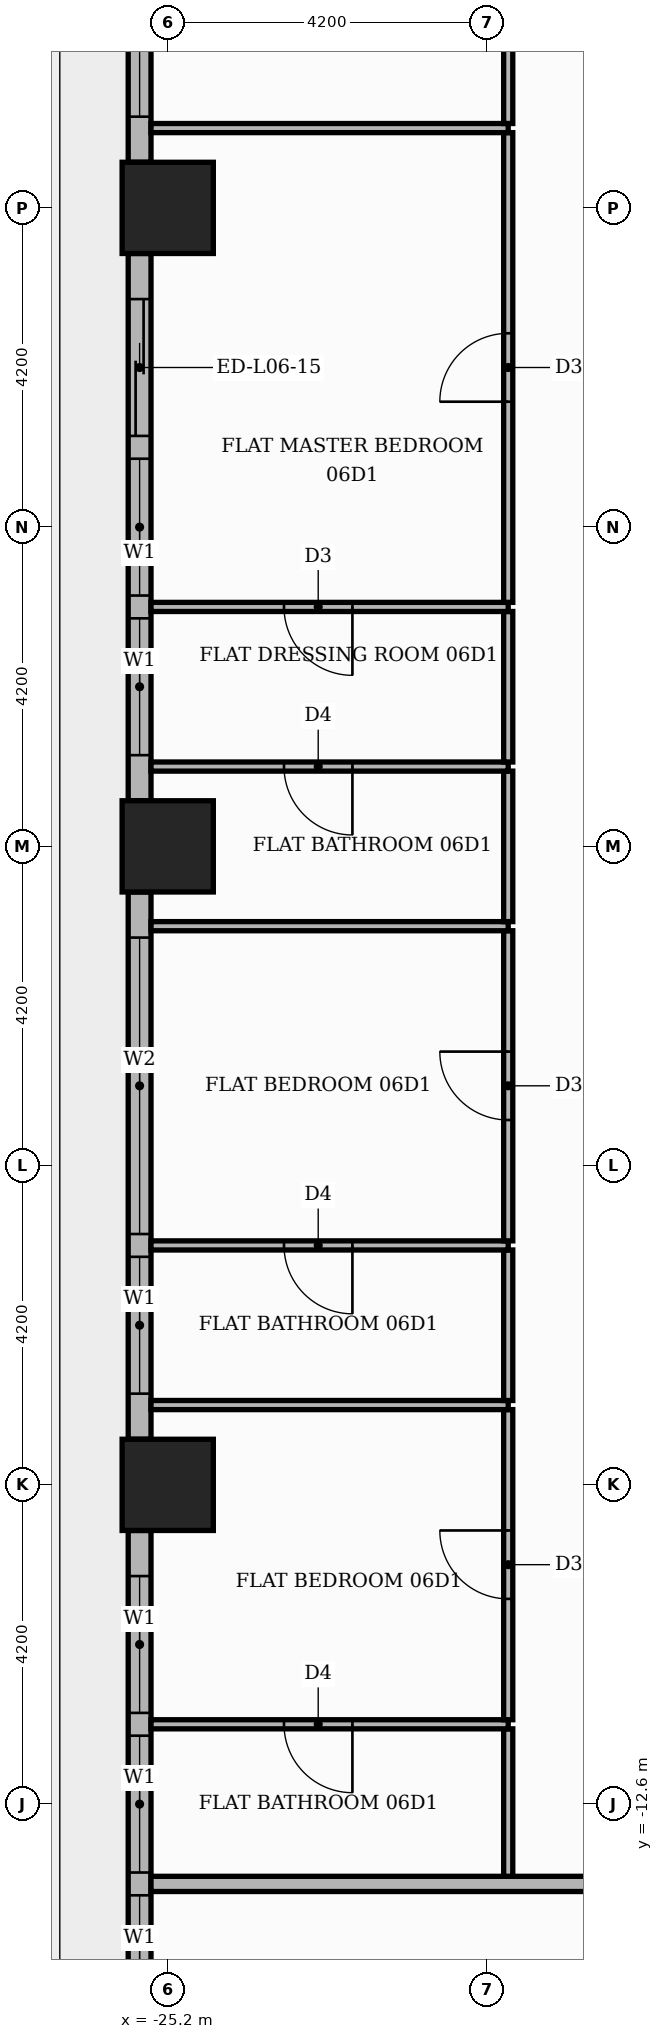
"""IFC4 building model, lengths in metres.
Left out: names, types, materials, properties, quantities, classifications, styles, units other than length and angle.
Written with IfcOpenShell. Run it as: python <this file> out.ifc"""

import sys

from ifc_helpers import new_model, si_unit, direction, frame, frame_2d, origin, origin_2d, place, context, subcontext, project, spatial, rectangle, extrude, element, fill, save


model = new_model("IFC4")
c1 = context("Model", 3, precision=1e-05, world=origin(), true_north=direction((0.0, 1.0)))
c2 = subcontext(c1, "Body", "Model", "MODEL_VIEW")
j1 = project(units=[si_unit("LENGTHUNIT", "METRE"), si_unit("PLANEANGLEUNIT", "RADIAN")], contexts=[c1])
p1 = place(None, origin())
s1 = spatial("IfcSite", under=j1, at=p1, CompositionType="ELEMENT")
p2 = place(p1, origin())
s2 = spatial("IfcBuilding", under=s1, at=p2, CompositionType="ELEMENT")
p3 = place(p2, frame((0.0, 0.0, 30.9)))
s3 = spatial("IfcBuildingStorey", under=s2, at=p3, CompositionType="ELEMENT", Elevation=30.9)
for number, where, z_axis, x_axis in (
    (1, (-25.2, 0.0, 0.0), (0.0, 0.0, 1.0), (1.0, 0.0, 0.0)),
    (2, (-25.2, -8.4, 0.0), (0.0, 0.0, 1.0), (1.0, 0.0, 0.0)),
    (3, (-25.2, 8.4, 0.0), (0.0, 0.0, 1.0), (1.0, 0.0, 0.0)),
):
    element("IfcColumn", number, at=place(p3, frame(where, z_axis=z_axis, x_axis=x_axis)), inside=s3, PredefinedType="COLUMN", context=c2, shape_type="SweptSolid", body=[
        extrude(rectangle(XDim=1.2, YDim=1.2, at=origin_2d()), origin(), (0.0, 0.0, 1.0), 3.9),
    ])
p4 = place(p3, frame((-25.57, 16.2, 0.0), z_axis=(0.0, 0.0, 1.0), x_axis=(0.0, -1.0, 0.0)))
e4 = element("IfcWall", 4, at=p4, inside=s3, PredefinedType="STANDARD", context=c2, shape_type="SweptSolid", body=[
    extrude(rectangle(XDim=7.2, YDim=0.3, at=frame_2d((3.6, 0.0))), origin(), (0.0, 0.0, 1.0), 3.48),
])
p5 = place(p4, frame((0.6, 0.0, 0.0)))
e5 = element("IfcOpeningElement", 5, at=p5, cuts=e4, PredefinedType="OPENING", context=c2, shape_type="SweptSolid", body=[
    extrude(rectangle(XDim=1.8, YDim=2.4, at=frame_2d((0.9, 1.2))), frame((0.0, 0.16, 0.0), z_axis=(0.0, -1.0, 0.0), x_axis=(1.0, 0.0, 0.0)), (0.0, 0.0, 1.0), 0.32),
])
p6 = place(p4, frame((2.7, 0.0, 0.9)))
e6 = element("IfcOpeningElement", 6, at=p6, cuts=e4, PredefinedType="OPENING", context=c2, shape_type="SweptSolid", body=[
    extrude(rectangle(XDim=3.9, YDim=2.1, at=frame_2d((1.95, 1.05))), frame((0.0, 0.16, 0.0), z_axis=(0.0, -1.0, 0.0), x_axis=(1.0, 0.0, 0.0)), (0.0, 0.0, 1.0), 0.32),
])
p7 = place(p3, frame((-25.57, 7.8, 0.0), z_axis=(0.0, 0.0, 1.0), x_axis=(0.0, -1.0, 0.0)))
e7 = element("IfcWall", 7, at=p7, inside=s3, PredefinedType="STANDARD", context=c2, shape_type="SweptSolid", body=[
    extrude(rectangle(XDim=7.2, YDim=0.3, at=frame_2d((3.6, 0.0))), origin(), (0.0, 0.0, 1.0), 3.48),
])
p8 = place(p7, frame((0.6, 0.0, 0.0)))
e8 = element("IfcOpeningElement", 8, at=p8, cuts=e7, PredefinedType="OPENING", context=c2, shape_type="SweptSolid", body=[
    extrude(rectangle(XDim=1.8, YDim=2.4, at=frame_2d((0.9, 1.2))), frame((0.0, 0.16, 0.0), z_axis=(0.0, -1.0, 0.0), x_axis=(1.0, 0.0, 0.0)), (0.0, 0.0, 1.0), 0.32),
])
p9 = place(p7, frame((2.7, 0.0, 0.9)))
e9 = element("IfcOpeningElement", 9, at=p9, cuts=e7, PredefinedType="OPENING", context=c2, shape_type="SweptSolid", body=[
    extrude(rectangle(XDim=1.8, YDim=2.1, at=frame_2d((0.9, 1.05))), frame((0.0, 0.16, 0.0), z_axis=(0.0, -1.0, 0.0), x_axis=(1.0, 0.0, 0.0)), (0.0, 0.0, 1.0), 0.32),
])
p10 = place(p7, frame((4.8, 0.0, 0.9)))
e10 = element("IfcOpeningElement", 10, at=p10, cuts=e7, PredefinedType="OPENING", context=c2, shape_type="SweptSolid", body=[
    extrude(rectangle(XDim=1.8, YDim=2.1, at=frame_2d((0.9, 1.05))), frame((0.0, 0.16, 0.0), z_axis=(0.0, -1.0, 0.0), x_axis=(1.0, 0.0, 0.0)), (0.0, 0.0, 1.0), 0.32),
])
p11 = place(p3, frame((-25.57, -0.6, 0.0), z_axis=(0.0, 0.0, 1.0), x_axis=(0.0, -1.0, 0.0)))
e11 = element("IfcWall", 11, at=p11, inside=s3, PredefinedType="STANDARD", context=c2, shape_type="SweptSolid", body=[
    extrude(rectangle(XDim=7.2, YDim=0.3, at=frame_2d((3.6, 0.0))), origin(), (0.0, 0.0, 1.0), 3.48),
])
p12 = place(p11, frame((0.6, 0.0, 0.9)))
e12 = element("IfcOpeningElement", 12, at=p12, cuts=e11, PredefinedType="OPENING", context=c2, shape_type="SweptSolid", body=[
    extrude(rectangle(XDim=3.9, YDim=2.1, at=frame_2d((1.95, 1.05))), frame((0.0, 0.16, 0.0), z_axis=(0.0, -1.0, 0.0), x_axis=(1.0, 0.0, 0.0)), (0.0, 0.0, 1.0), 0.32),
])
p13 = place(p11, frame((4.8, 0.0, 0.9)))
e13 = element("IfcOpeningElement", 13, at=p13, cuts=e11, PredefinedType="OPENING", context=c2, shape_type="SweptSolid", body=[
    extrude(rectangle(XDim=1.8, YDim=2.1, at=frame_2d((0.9, 1.05))), frame((0.0, 0.16, 0.0), z_axis=(0.0, -1.0, 0.0), x_axis=(1.0, 0.0, 0.0)), (0.0, 0.0, 1.0), 0.32),
])
p14 = place(p3, frame((-25.57, -9.0, 0.0), z_axis=(0.0, 0.0, 1.0), x_axis=(0.0, -1.0, 0.0)))
e14 = element("IfcWall", 14, at=p14, inside=s3, PredefinedType="STANDARD", context=c2, shape_type="SweptSolid", body=[
    extrude(rectangle(XDim=7.2, YDim=0.3, at=frame_2d((3.6, 0.0))), origin(), (0.0, 0.0, 1.0), 3.48),
])
p15 = place(p14, frame((0.6, 0.0, 0.9)))
e15 = element("IfcOpeningElement", 15, at=p15, cuts=e14, PredefinedType="OPENING", context=c2, shape_type="SweptSolid", body=[
    extrude(rectangle(XDim=1.8, YDim=2.1, at=frame_2d((0.9, 1.05))), frame((0.0, 0.16, 0.0), z_axis=(0.0, -1.0, 0.0), x_axis=(1.0, 0.0, 0.0)), (0.0, 0.0, 1.0), 0.32),
])
p16 = place(p14, frame((2.7, 0.0, 0.9)))
e16 = element("IfcOpeningElement", 16, at=p16, cuts=e14, PredefinedType="OPENING", context=c2, shape_type="SweptSolid", body=[
    extrude(rectangle(XDim=1.8, YDim=2.1, at=frame_2d((0.9, 1.05))), frame((0.0, 0.16, 0.0), z_axis=(0.0, -1.0, 0.0), x_axis=(1.0, 0.0, 0.0)), (0.0, 0.0, 1.0), 0.32),
])
p17 = place(p14, frame((4.8, 0.0, 0.9)))
e17 = element("IfcOpeningElement", 17, at=p17, cuts=e14, PredefinedType="OPENING", context=c2, shape_type="SweptSolid", body=[
    extrude(rectangle(XDim=1.8, YDim=2.1, at=frame_2d((0.9, 1.05))), frame((0.0, 0.16, 0.0), z_axis=(0.0, -1.0, 0.0), x_axis=(1.0, 0.0, 0.0)), (0.0, 0.0, 1.0), 0.32),
])
p18 = place(p3, frame((-25.42, -13.65, 0.0), z_axis=(0.0, 0.0, 1.0), x_axis=(1.0, 0.0, 0.0)))
e18 = element("IfcWall", 18, at=p18, inside=s3, PredefinedType="PARTITIONING", context=c2, shape_type="SweptSolid", body=[
    extrude(rectangle(XDim=39.07, YDim=0.2, at=frame_2d((19.535, 0.0))), origin(), (0.0, 0.0, 1.0), 3.48),
])
p19 = place(p18, frame((14.37, 0.0, 0.0)))
e19 = element("IfcOpeningElement", 19, at=p19, cuts=e18, PredefinedType="OPENING", context=c2, shape_type="SweptSolid", body=[
    extrude(rectangle(XDim=1.1, YDim=2.4, at=frame_2d((0.55, 1.2))), frame((0.0, 0.11, 0.0), z_axis=(0.0, -1.0, 0.0), x_axis=(1.0, 0.0, 0.0)), (0.0, 0.0, 1.0), 0.22),
])
p20 = place(p3, frame((-20.72, -13.55, 0.0), z_axis=(0.0, 0.0, 1.0), x_axis=(0.0, 1.0, 0.0)))
e20 = element("IfcWall", 20, at=p20, inside=s3, PredefinedType="PARTITIONING", context=c2, shape_type="SweptSolid", body=[
    extrude(rectangle(XDim=1.94, YDim=0.12, at=frame_2d((0.97, 0.0))), origin(), (0.0, 0.0, 1.0), 3.48),
])
p21 = place(p3, frame((-25.42, -11.55, 0.0), z_axis=(0.0, 0.0, 1.0), x_axis=(1.0, 0.0, 0.0)))
e21 = element("IfcWall", 21, at=p21, inside=s3, PredefinedType="PARTITIONING", context=c2, shape_type="SweptSolid", body=[
    extrude(rectangle(XDim=4.7, YDim=0.12, at=frame_2d((2.35, 0.0))), origin(), (0.0, 0.0, 1.0), 3.48),
])
p22 = place(p21, frame((1.75, 0.0, 0.0)))
e22 = element("IfcOpeningElement", 22, at=p22, cuts=e21, PredefinedType="OPENING", context=c2, shape_type="SweptSolid", body=[
    extrude(rectangle(XDim=0.9, YDim=2.1, at=frame_2d((0.45, 1.05))), frame((0.0, 0.07, 0.0), z_axis=(0.0, -1.0, 0.0), x_axis=(1.0, 0.0, 0.0)), (0.0, 0.0, 1.0), 0.14),
])
p23 = place(p3, frame((-20.72, -11.49, 0.0), z_axis=(0.0, 0.0, 1.0), x_axis=(0.0, 1.0, 0.0)))
e23 = element("IfcWall", 23, at=p23, inside=s3, PredefinedType="PARTITIONING", context=c2, shape_type="SweptSolid", body=[
    extrude(rectangle(XDim=4.08, YDim=0.12, at=frame_2d((2.04, 0.0))), origin(), (0.0, 0.0, 1.0), 3.48),
])
p24 = place(p23, frame((1.59, 0.0, 0.0)))
e24 = element("IfcOpeningElement", 24, at=p24, cuts=e23, PredefinedType="OPENING", context=c2, shape_type="SweptSolid", body=[
    extrude(rectangle(XDim=0.9, YDim=2.1, at=frame_2d((0.45, 1.05))), frame((0.0, 0.07, 0.0), z_axis=(0.0, -1.0, 0.0), x_axis=(1.0, 0.0, 0.0)), (0.0, 0.0, 1.0), 0.14),
])
p25 = place(p3, frame((-25.42, -7.35, 0.0), z_axis=(0.0, 0.0, 1.0), x_axis=(1.0, 0.0, 0.0)))
e25 = element("IfcWall", 25, at=p25, inside=s3, PredefinedType="PARTITIONING", context=c2, shape_type="SweptSolid", body=[
    extrude(rectangle(XDim=4.7, YDim=0.12, at=frame_2d((2.35, 0.0))), origin(), (0.0, 0.0, 1.0), 3.48),
])
p26 = place(p3, frame((-20.72, -7.29, 0.0), z_axis=(0.0, 0.0, 1.0), x_axis=(0.0, 1.0, 0.0)))
e26 = element("IfcWall", 26, at=p26, inside=s3, PredefinedType="PARTITIONING", context=c2, shape_type="SweptSolid", body=[
    extrude(rectangle(XDim=1.98, YDim=0.12, at=frame_2d((0.99, 0.0))), origin(), (0.0, 0.0, 1.0), 3.48),
])
p27 = place(p3, frame((-25.42, -5.25, 0.0), z_axis=(0.0, 0.0, 1.0), x_axis=(1.0, 0.0, 0.0)))
e27 = element("IfcWall", 27, at=p27, inside=s3, PredefinedType="PARTITIONING", context=c2, shape_type="SweptSolid", body=[
    extrude(rectangle(XDim=4.7, YDim=0.12, at=frame_2d((2.35, 0.0))), origin(), (0.0, 0.0, 1.0), 3.48),
])
p28 = place(p27, frame((1.75, 0.0, 0.0)))
e28 = element("IfcOpeningElement", 28, at=p28, cuts=e27, PredefinedType="OPENING", context=c2, shape_type="SweptSolid", body=[
    extrude(rectangle(XDim=0.9, YDim=2.1, at=frame_2d((0.45, 1.05))), frame((0.0, 0.07, 0.0), z_axis=(0.0, -1.0, 0.0), x_axis=(1.0, 0.0, 0.0)), (0.0, 0.0, 1.0), 0.14),
])
p29 = place(p3, frame((-20.72, -5.19, 0.0), z_axis=(0.0, 0.0, 1.0), x_axis=(0.0, 1.0, 0.0)))
e29 = element("IfcWall", 29, at=p29, inside=s3, PredefinedType="PARTITIONING", context=c2, shape_type="SweptSolid", body=[
    extrude(rectangle(XDim=4.08, YDim=0.12, at=frame_2d((2.04, 0.0))), origin(), (0.0, 0.0, 1.0), 3.48),
])
p30 = place(p29, frame((1.59, 0.0, 0.0)))
e30 = element("IfcOpeningElement", 30, at=p30, cuts=e29, PredefinedType="OPENING", context=c2, shape_type="SweptSolid", body=[
    extrude(rectangle(XDim=0.9, YDim=2.1, at=frame_2d((0.45, 1.05))), frame((0.0, 0.07, 0.0), z_axis=(0.0, -1.0, 0.0), x_axis=(1.0, 0.0, 0.0)), (0.0, 0.0, 1.0), 0.14),
])
p31 = place(p3, frame((-25.42, -1.05, 0.0), z_axis=(0.0, 0.0, 1.0), x_axis=(1.0, 0.0, 0.0)))
e31 = element("IfcWall", 31, at=p31, inside=s3, PredefinedType="PARTITIONING", context=c2, shape_type="SweptSolid", body=[
    extrude(rectangle(XDim=4.7, YDim=0.12, at=frame_2d((2.35, 0.0))), origin(), (0.0, 0.0, 1.0), 3.48),
])
p32 = place(p3, frame((-20.72, -0.99, 0.0), z_axis=(0.0, 0.0, 1.0), x_axis=(0.0, 1.0, 0.0)))
e32 = element("IfcWall", 32, at=p32, inside=s3, PredefinedType="PARTITIONING", context=c2, shape_type="SweptSolid", body=[
    extrude(rectangle(XDim=1.98, YDim=0.12, at=frame_2d((0.99, 0.0))), origin(), (0.0, 0.0, 1.0), 3.48),
])
p33 = place(p3, frame((-25.42, 1.05, 0.0), z_axis=(0.0, 0.0, 1.0), x_axis=(1.0, 0.0, 0.0)))
e33 = element("IfcWall", 33, at=p33, inside=s3, PredefinedType="PARTITIONING", context=c2, shape_type="SweptSolid", body=[
    extrude(rectangle(XDim=4.7, YDim=0.12, at=frame_2d((2.35, 0.0))), origin(), (0.0, 0.0, 1.0), 3.48),
])
p34 = place(p33, frame((1.75, 0.0, 0.0)))
e34 = element("IfcOpeningElement", 34, at=p34, cuts=e33, PredefinedType="OPENING", context=c2, shape_type="SweptSolid", body=[
    extrude(rectangle(XDim=0.9, YDim=2.1, at=frame_2d((0.45, 1.05))), frame((0.0, 0.07, 0.0), z_axis=(0.0, -1.0, 0.0), x_axis=(1.0, 0.0, 0.0)), (0.0, 0.0, 1.0), 0.14),
])
p35 = place(p3, frame((-20.72, 1.11, 0.0), z_axis=(0.0, 0.0, 1.0), x_axis=(0.0, 1.0, 0.0)))
e35 = element("IfcWall", 35, at=p35, inside=s3, PredefinedType="PARTITIONING", context=c2, shape_type="SweptSolid", body=[
    extrude(rectangle(XDim=1.98, YDim=0.12, at=frame_2d((0.99, 0.0))), origin(), (0.0, 0.0, 1.0), 3.48),
])
p36 = place(p3, frame((-25.42, 3.15, 0.0), z_axis=(0.0, 0.0, 1.0), x_axis=(1.0, 0.0, 0.0)))
e36 = element("IfcWall", 36, at=p36, inside=s3, PredefinedType="PARTITIONING", context=c2, shape_type="SweptSolid", body=[
    extrude(rectangle(XDim=4.7, YDim=0.12, at=frame_2d((2.35, 0.0))), origin(), (0.0, 0.0, 1.0), 3.48),
])
p37 = place(p36, frame((1.75, 0.0, 0.0)))
e37 = element("IfcOpeningElement", 37, at=p37, cuts=e36, PredefinedType="OPENING", context=c2, shape_type="SweptSolid", body=[
    extrude(rectangle(XDim=0.9, YDim=2.1, at=frame_2d((0.45, 1.05))), frame((0.0, 0.07, 0.0), z_axis=(0.0, -1.0, 0.0), x_axis=(1.0, 0.0, 0.0)), (0.0, 0.0, 1.0), 0.14),
])
p38 = place(p3, frame((-20.72, 3.21, 0.0), z_axis=(0.0, 0.0, 1.0), x_axis=(0.0, 1.0, 0.0)))
e38 = element("IfcWall", 38, at=p38, inside=s3, PredefinedType="PARTITIONING", context=c2, shape_type="SweptSolid", body=[
    extrude(rectangle(XDim=6.18, YDim=0.12, at=frame_2d((3.09, 0.0))), origin(), (0.0, 0.0, 1.0), 3.48),
])
p39 = place(p38, frame((2.64, 0.0, 0.0)))
e39 = element("IfcOpeningElement", 39, at=p39, cuts=e38, PredefinedType="OPENING", context=c2, shape_type="SweptSolid", body=[
    extrude(rectangle(XDim=0.9, YDim=2.1, at=frame_2d((0.45, 1.05))), frame((0.0, 0.07, 0.0), z_axis=(0.0, -1.0, 0.0), x_axis=(1.0, 0.0, 0.0)), (0.0, 0.0, 1.0), 0.14),
])
p40 = place(p3, frame((-25.42, 9.45, 0.0), z_axis=(0.0, 0.0, 1.0), x_axis=(1.0, 0.0, 0.0)))
e40 = element("IfcWall", 40, at=p40, inside=s3, PredefinedType="PARTITIONING", context=c2, shape_type="SweptSolid", body=[
    extrude(rectangle(XDim=4.7, YDim=0.12, at=frame_2d((2.35, 0.0))), origin(), (0.0, 0.0, 1.0), 3.48),
])
p41 = place(p3, frame((-20.72, 9.51, 0.0), z_axis=(0.0, 0.0, 1.0), x_axis=(0.0, 1.0, 0.0)))
e41 = element("IfcWall", 41, at=p41, inside=s3, PredefinedType="PARTITIONING", context=c2, shape_type="SweptSolid", body=[
    extrude(rectangle(XDim=4.08, YDim=0.12, at=frame_2d((2.04, 0.0))), origin(), (0.0, 0.0, 1.0), 3.48),
])
p42 = place(p41, frame((1.59, 0.0, 0.0)))
e42 = element("IfcOpeningElement", 42, at=p42, cuts=e41, PredefinedType="OPENING", context=c2, shape_type="SweptSolid", body=[
    extrude(rectangle(XDim=0.9, YDim=2.1, at=frame_2d((0.45, 1.05))), frame((0.0, 0.07, 0.0), z_axis=(0.0, -1.0, 0.0), x_axis=(1.0, 0.0, 0.0)), (0.0, 0.0, 1.0), 0.14),
])
p43 = place(p6, origin())
e43 = element("IfcWindow", 43, at=p43, inside=s3, PartitioningType="SINGLE_PANEL", PredefinedType="WINDOW", context=c2, shape_type="SweptSolid", body=[
    extrude(rectangle(XDim=3.9, YDim=2.1, at=frame_2d((1.95, 1.05))), frame((0.0, 0.03, 0.0), z_axis=(0.0, -1.0, 0.0), x_axis=(1.0, 0.0, 0.0)), (0.0, 0.0, 1.0), 0.06),
])
fill(e6, e43)
p44 = place(p8, origin())
e44 = element("IfcDoor", 44, at=p44, inside=s3, OperationType="SLIDING_TO_LEFT", PredefinedType="DOOR", context=c2, shape_type="SweptSolid", body=[
    extrude(rectangle(XDim=1.8, YDim=2.4, at=frame_2d((0.9, 1.2))), frame((0.0, 0.025, 0.0), z_axis=(0.0, -1.0, 0.0), x_axis=(1.0, 0.0, 0.0)), (0.0, 0.0, 1.0), 0.05),
])
fill(e8, e44)
p45 = place(p9, origin())
e45 = element("IfcWindow", 45, at=p45, inside=s3, PartitioningType="SINGLE_PANEL", PredefinedType="WINDOW", context=c2, shape_type="SweptSolid", body=[
    extrude(rectangle(XDim=1.8, YDim=2.1, at=frame_2d((0.9, 1.05))), frame((0.0, 0.03, 0.0), z_axis=(0.0, -1.0, 0.0), x_axis=(1.0, 0.0, 0.0)), (0.0, 0.0, 1.0), 0.06),
])
fill(e9, e45)
p46 = place(p10, origin())
e46 = element("IfcWindow", 46, at=p46, inside=s3, PartitioningType="SINGLE_PANEL", PredefinedType="WINDOW", context=c2, shape_type="SweptSolid", body=[
    extrude(rectangle(XDim=1.8, YDim=2.1, at=frame_2d((0.9, 1.05))), frame((0.0, 0.03, 0.0), z_axis=(0.0, -1.0, 0.0), x_axis=(1.0, 0.0, 0.0)), (0.0, 0.0, 1.0), 0.06),
])
fill(e10, e46)
p47 = place(p12, origin())
e47 = element("IfcWindow", 47, at=p47, inside=s3, PartitioningType="SINGLE_PANEL", PredefinedType="WINDOW", context=c2, shape_type="SweptSolid", body=[
    extrude(rectangle(XDim=3.9, YDim=2.1, at=frame_2d((1.95, 1.05))), frame((0.0, 0.03, 0.0), z_axis=(0.0, -1.0, 0.0), x_axis=(1.0, 0.0, 0.0)), (0.0, 0.0, 1.0), 0.06),
])
fill(e12, e47)
p48 = place(p13, origin())
e48 = element("IfcWindow", 48, at=p48, inside=s3, PartitioningType="SINGLE_PANEL", PredefinedType="WINDOW", context=c2, shape_type="SweptSolid", body=[
    extrude(rectangle(XDim=1.8, YDim=2.1, at=frame_2d((0.9, 1.05))), frame((0.0, 0.03, 0.0), z_axis=(0.0, -1.0, 0.0), x_axis=(1.0, 0.0, 0.0)), (0.0, 0.0, 1.0), 0.06),
])
fill(e13, e48)
p49 = place(p15, origin())
e49 = element("IfcWindow", 49, at=p49, inside=s3, PartitioningType="SINGLE_PANEL", PredefinedType="WINDOW", context=c2, shape_type="SweptSolid", body=[
    extrude(rectangle(XDim=1.8, YDim=2.1, at=frame_2d((0.9, 1.05))), frame((0.0, 0.03, 0.0), z_axis=(0.0, -1.0, 0.0), x_axis=(1.0, 0.0, 0.0)), (0.0, 0.0, 1.0), 0.06),
])
fill(e15, e49)
p50 = place(p16, origin())
e50 = element("IfcWindow", 50, at=p50, inside=s3, PartitioningType="SINGLE_PANEL", PredefinedType="WINDOW", context=c2, shape_type="SweptSolid", body=[
    extrude(rectangle(XDim=1.8, YDim=2.1, at=frame_2d((0.9, 1.05))), frame((0.0, 0.03, 0.0), z_axis=(0.0, -1.0, 0.0), x_axis=(1.0, 0.0, 0.0)), (0.0, 0.0, 1.0), 0.06),
])
fill(e16, e50)
p51 = place(p17, origin())
e51 = element("IfcWindow", 51, at=p51, inside=s3, PartitioningType="SINGLE_PANEL", PredefinedType="WINDOW", context=c2, shape_type="SweptSolid", body=[
    extrude(rectangle(XDim=1.8, YDim=2.1, at=frame_2d((0.9, 1.05))), frame((0.0, 0.03, 0.0), z_axis=(0.0, -1.0, 0.0), x_axis=(1.0, 0.0, 0.0)), (0.0, 0.0, 1.0), 0.06),
])
fill(e17, e51)
p52 = place(p39, origin())
e52 = element("IfcDoor", 52, at=p52, inside=s3, OperationType="SINGLE_SWING_LEFT", PredefinedType="DOOR", context=c2, shape_type="SweptSolid", body=[
    extrude(rectangle(XDim=0.9, YDim=2.1, at=frame_2d((0.45, 1.05))), frame((0.0, 0.025, 0.0), z_axis=(0.0, -1.0, 0.0), x_axis=(1.0, 0.0, 0.0)), (0.0, 0.0, 1.0), 0.05),
])
fill(e39, e52)
p53 = place(p37, frame((0.9, 0.0, 0.0), z_axis=(0.0, 0.0, 1.0), x_axis=(-1.0, 0.0, 0.0)))
e53 = element("IfcDoor", 53, at=p53, inside=s3, OperationType="SINGLE_SWING_RIGHT", PredefinedType="DOOR", context=c2, shape_type="SweptSolid", body=[
    extrude(rectangle(XDim=0.9, YDim=2.1, at=frame_2d((0.45, 1.05))), frame((0.0, 0.025, 0.0), z_axis=(0.0, -1.0, 0.0), x_axis=(1.0, 0.0, 0.0)), (0.0, 0.0, 1.0), 0.05),
])
fill(e37, e53)
p54 = place(p34, frame((0.9, 0.0, 0.0), z_axis=(0.0, 0.0, 1.0), x_axis=(-1.0, 0.0, 0.0)))
e54 = element("IfcDoor", 54, at=p54, inside=s3, OperationType="SINGLE_SWING_RIGHT", PredefinedType="DOOR", context=c2, shape_type="SweptSolid", body=[
    extrude(rectangle(XDim=0.9, YDim=2.1, at=frame_2d((0.45, 1.05))), frame((0.0, 0.025, 0.0), z_axis=(0.0, -1.0, 0.0), x_axis=(1.0, 0.0, 0.0)), (0.0, 0.0, 1.0), 0.05),
])
fill(e34, e54)
p55 = place(p30, origin())
e55 = element("IfcDoor", 55, at=p55, inside=s3, OperationType="SINGLE_SWING_RIGHT", PredefinedType="DOOR", context=c2, shape_type="SweptSolid", body=[
    extrude(rectangle(XDim=0.9, YDim=2.1, at=frame_2d((0.45, 1.05))), frame((0.0, 0.025, 0.0), z_axis=(0.0, -1.0, 0.0), x_axis=(1.0, 0.0, 0.0)), (0.0, 0.0, 1.0), 0.05),
])
fill(e30, e55)
p56 = place(p28, frame((0.9, 0.0, 0.0), z_axis=(0.0, 0.0, 1.0), x_axis=(-1.0, 0.0, 0.0)))
e56 = element("IfcDoor", 56, at=p56, inside=s3, OperationType="SINGLE_SWING_RIGHT", PredefinedType="DOOR", context=c2, shape_type="SweptSolid", body=[
    extrude(rectangle(XDim=0.9, YDim=2.1, at=frame_2d((0.45, 1.05))), frame((0.0, 0.025, 0.0), z_axis=(0.0, -1.0, 0.0), x_axis=(1.0, 0.0, 0.0)), (0.0, 0.0, 1.0), 0.05),
])
fill(e28, e56)
p57 = place(p24, origin())
e57 = element("IfcDoor", 57, at=p57, inside=s3, OperationType="SINGLE_SWING_RIGHT", PredefinedType="DOOR", context=c2, shape_type="SweptSolid", body=[
    extrude(rectangle(XDim=0.9, YDim=2.1, at=frame_2d((0.45, 1.05))), frame((0.0, 0.025, 0.0), z_axis=(0.0, -1.0, 0.0), x_axis=(1.0, 0.0, 0.0)), (0.0, 0.0, 1.0), 0.05),
])
fill(e24, e57)
p58 = place(p22, frame((0.9, 0.0, 0.0), z_axis=(0.0, 0.0, 1.0), x_axis=(-1.0, 0.0, 0.0)))
e58 = element("IfcDoor", 58, at=p58, inside=s3, OperationType="SINGLE_SWING_RIGHT", PredefinedType="DOOR", context=c2, shape_type="SweptSolid", body=[
    extrude(rectangle(XDim=0.9, YDim=2.1, at=frame_2d((0.45, 1.05))), frame((0.0, 0.025, 0.0), z_axis=(0.0, -1.0, 0.0), x_axis=(1.0, 0.0, 0.0)), (0.0, 0.0, 1.0), 0.05),
])
fill(e22, e58)
save(model, sys.argv[1])
